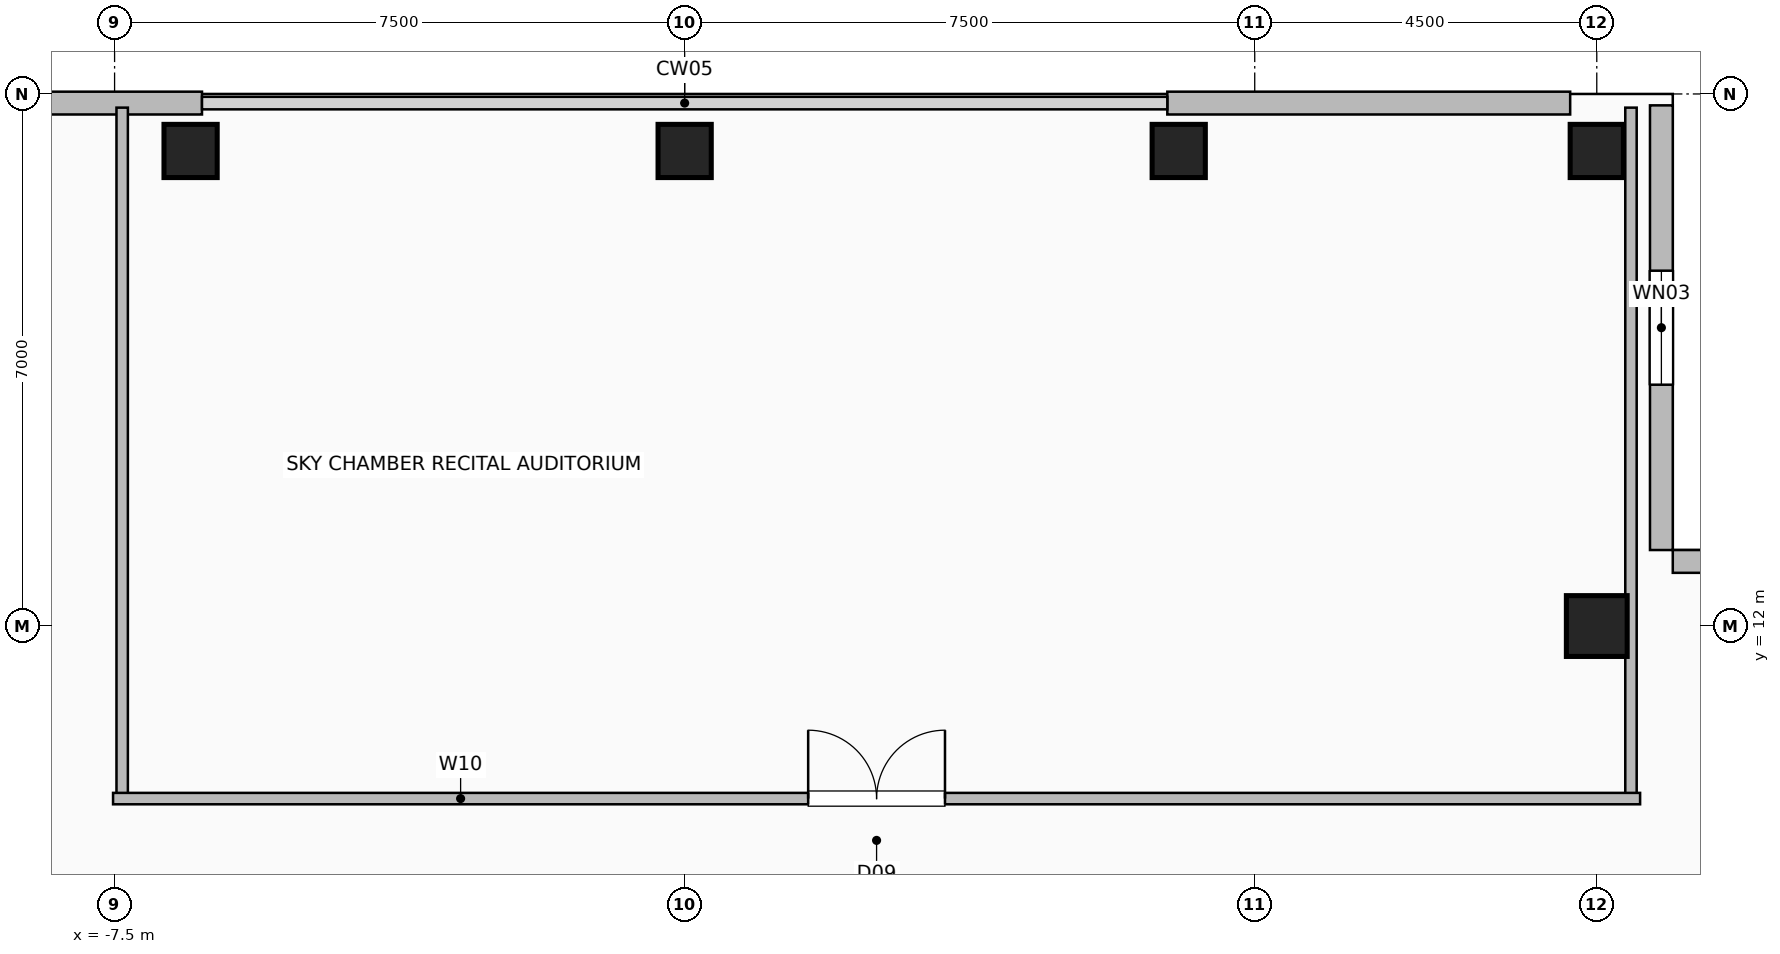
"""IFC4 building model, lengths in metres.
Left out: names, types, materials, properties, quantities, classifications, styles, units other than length and angle.
Written with IfcOpenShell. Run it as: python <this file> out.ifc"""

import sys

from ifc_helpers import new_model, si_unit, direction, frame, frame_2d, origin, origin_2d, place, context, subcontext, project, spatial, rectangle, hollow_rectangle, extrude, element, fill, save


model = new_model("IFC4")
c1 = context("Model", 3, precision=1e-05, world=origin(), true_north=direction((0.0, 1.0)))
c2 = subcontext(c1, "Body", "Model", "MODEL_VIEW")
j1 = project(units=[si_unit("LENGTHUNIT", "METRE"), si_unit("PLANEANGLEUNIT", "RADIAN")], contexts=[c1])
p1 = place(None, origin())
s1 = spatial("IfcSite", under=j1, at=p1, CompositionType="ELEMENT")
p2 = place(p1, origin())
s2 = spatial("IfcBuilding", under=s1, at=p2, CompositionType="ELEMENT")
p3 = place(p2, frame((0.0, 0.0, 290.0)))
s3 = spatial("IfcBuildingStorey", under=s2, at=p3, CompositionType="ELEMENT", Elevation=290.0)
for number, where, z_axis, x_axis in (
    (1, (-6.5, 18.25, 0.0), (0.0, 0.0, 1.0), (1.0, 0.0, 0.0)),
    (2, (0.0, 18.25, 0.0), (0.0, 0.0, 1.0), (1.0, 0.0, 0.0)),
    (3, (6.5, 18.25, 0.0), (0.0, 0.0, 1.0), (1.0, 0.0, 0.0)),
    (4, (12.0, 18.25, 0.0), (0.0, 0.0, 1.0), (1.0, 0.0, 0.0)),
):
    element("IfcColumn", number, at=place(p3, frame(where, z_axis=z_axis, x_axis=x_axis)), inside=s3, PredefinedType="COLUMN", context=c2, shape_type="SweptSolid", body=[
        extrude(hollow_rectangle(XDim=0.7, YDim=0.7, WallThickness=0.035, at=origin_2d()), origin(), (0.0, 0.0, 1.0), 3.6),
    ])
p4 = place(p3, frame((12.0, 12.0, 0.0), z_axis=(0.0, 0.0, 1.0), x_axis=(1.0, 0.0, 0.0)))
e5 = element("IfcColumn", 5, at=p4, inside=s3, PredefinedType="COLUMN", context=c2, shape_type="SweptSolid", body=[
    extrude(hollow_rectangle(XDim=0.8, YDim=0.8, WallThickness=0.04, at=origin_2d()), origin(), (0.0, 0.0, 1.0), 3.6),
])
for number, where, z_axis, x_axis in (
    (6, (-11.65, 18.88, 0.0), (0.0, 0.0, 1.0), (1.0, 0.0, 0.0)),
    (7, (6.35, 18.88, 0.0), (0.0, 0.0, 1.0), (1.0, 0.0, 0.0)),
):
    element("IfcWall", number, at=place(p3, frame(where, z_axis=z_axis, x_axis=x_axis)), inside=s3, PredefinedType="SOLIDWALL", context=c2, shape_type="SweptSolid", body=[
        extrude(rectangle(XDim=5.3, YDim=0.3, at=frame_2d((2.65, 0.0))), origin(), (0.0, 0.0, 1.0), 3.36),
    ])
p5 = place(p3, frame((12.85, 18.85, 0.0), z_axis=(0.0, 0.0, 1.0), x_axis=(0.0, -1.0, 0.0)))
e8 = element("IfcWall", 8, at=p5, inside=s3, PredefinedType="SOLIDWALL", context=c2, shape_type="SweptSolid", body=[
    extrude(rectangle(XDim=5.85, YDim=0.3, at=frame_2d((2.925, 0.0))), origin(), (0.0, 0.0, 1.0), 3.36),
])
p6 = place(p5, frame((2.175, 0.0, 0.9)))
e9 = element("IfcOpeningElement", 9, at=p6, cuts=e8, PredefinedType="OPENING", context=c2, shape_type="SweptSolid", body=[
    extrude(rectangle(XDim=1.5, YDim=1.8, at=frame_2d((0.75, 0.9))), frame((0.0, 0.16, 0.0), z_axis=(0.0, -1.0, 0.0), x_axis=(1.0, 0.0, 0.0)), (0.0, 0.0, 1.0), 0.32),
])
p7 = place(p3, frame((18.85, 12.85, 0.0), z_axis=(0.0, 0.0, 1.0), x_axis=(-1.0, 0.0, 0.0)))
e10 = element("IfcWall", 10, at=p7, inside=s3, PredefinedType="SOLIDWALL", context=c2, shape_type="SweptSolid", body=[
    extrude(rectangle(XDim=5.85, YDim=0.3, at=frame_2d((2.925, 0.0))), origin(), (0.0, 0.0, 1.0), 3.36),
])
for number, where, z_axis, x_axis in (
    (11, (-7.4, 9.73, 0.0), (0.0, 0.0, 1.0), (0.0, 1.0, 0.0)),
    (12, (12.45, 9.73, 0.0), (0.0, 0.0, 1.0), (0.0, 1.0, 0.0)),
):
    element("IfcWall", number, at=place(p3, frame(where, z_axis=z_axis, x_axis=x_axis)), inside=s3, PredefinedType="PARTITIONING", context=c2, shape_type="SweptSolid", body=[
        extrude(rectangle(XDim=9.09, YDim=0.15, at=frame_2d((4.545, 0.0))), origin(), (0.0, 0.0, 1.0), 3.36),
    ])
p8 = place(p3, frame((-7.52, 9.73, 0.0), z_axis=(0.0, 0.0, 1.0), x_axis=(1.0, 0.0, 0.0)))
e13 = element("IfcWall", 13, at=p8, inside=s3, PredefinedType="PARTITIONING", context=c2, shape_type="SweptSolid", body=[
    extrude(rectangle(XDim=20.09, YDim=0.15, at=frame_2d((10.045, 0.0))), origin(), (0.0, 0.0, 1.0), 3.36),
])
p9 = place(p8, frame((9.145, 0.0, 0.0)))
e14 = element("IfcOpeningElement", 14, at=p9, cuts=e13, PredefinedType="OPENING", context=c2, shape_type="SweptSolid", body=[
    extrude(rectangle(XDim=1.8, YDim=2.08, at=frame_2d((0.9, 1.04))), frame((0.0, 0.085, 0.0), z_axis=(0.0, -1.0, 0.0), x_axis=(1.0, 0.0, 0.0)), (0.0, 0.0, 1.0), 0.17),
])
p10 = place(p6, origin())
e15 = element("IfcWindow", 15, at=p10, inside=s3, PartitioningType="SINGLE_PANEL", PredefinedType="WINDOW", context=c2, shape_type="SweptSolid", body=[
    extrude(rectangle(XDim=1.5, YDim=1.8, at=frame_2d((0.75, 0.9))), frame((0.0, 0.03, 0.0), z_axis=(0.0, -1.0, 0.0), x_axis=(1.0, 0.0, 0.0)), (0.0, 0.0, 1.0), 0.06),
])
fill(e9, e15)
p11 = place(p9, origin())
e16 = element("IfcDoor", 16, at=p11, inside=s3, OperationType="DOUBLE_DOOR_SINGLE_SWING", PredefinedType="DOOR", context=c2, shape_type="SweptSolid", body=[
    extrude(rectangle(XDim=1.8, YDim=2.08, at=frame_2d((0.9, 1.04))), frame((0.0, 0.025, 0.0), z_axis=(0.0, -1.0, 0.0), x_axis=(1.0, 0.0, 0.0)), (0.0, 0.0, 1.0), 0.05),
])
fill(e14, e16)
save(model, sys.argv[1])
